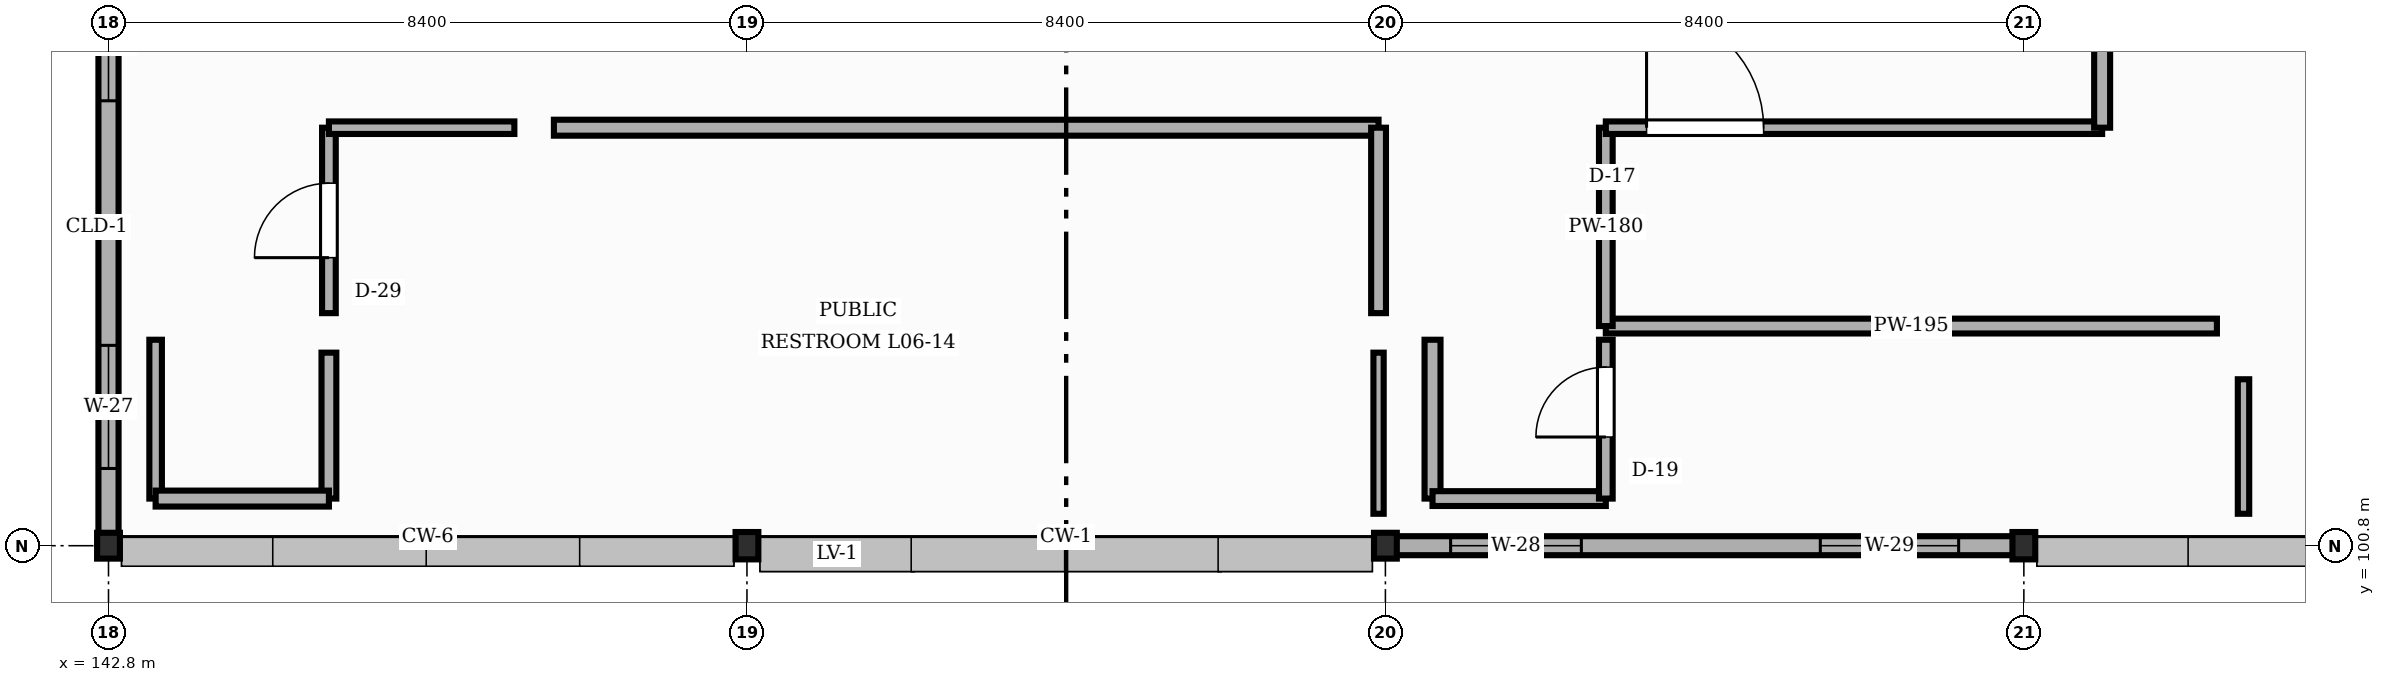
"""IFC4 building model, lengths in metres.
Left out: names, types, materials, properties, quantities, classifications, styles, units other than length and angle.
Written with IfcOpenShell. Run it as: python <this file> out.ifc"""

import sys

from ifc_helpers import new_model, si_unit, direction, frame, frame_2d, origin, origin_2d, place, context, subcontext, project, spatial, rectangle, i_section, extrude, element, fill, save


model = new_model("IFC4")
c1 = context("Model", 3, precision=1e-05, world=origin(), true_north=direction((0.0, 1.0)))
c2 = subcontext(c1, "Body", "Model", "MODEL_VIEW")
j1 = project(units=[si_unit("LENGTHUNIT", "METRE"), si_unit("PLANEANGLEUNIT", "RADIAN")], contexts=[c1])
p1 = place(None, origin())
s1 = spatial("IfcSite", under=j1, at=p1, CompositionType="ELEMENT")
p2 = place(p1, origin())
s2 = spatial("IfcBuilding", under=s1, at=p2, CompositionType="ELEMENT")
p3 = place(p2, frame((0.0, 0.0, 26.1)))
s3 = spatial("IfcBuildingStorey", under=s2, at=p3, CompositionType="ELEMENT", Elevation=26.1)
p4 = place(p3, frame((142.8, 100.8, 0.0), z_axis=(0.0, 0.0, 1.0), x_axis=(1.0, 0.0, 0.0)))
e1 = element("IfcColumn", 1, at=p4, inside=s3, PredefinedType="COLUMN", context=c2, shape_type="SweptSolid", body=[
    extrude(i_section(OverallWidth=0.3, OverallDepth=0.34, WebThickness=0.012, FlangeThickness=0.021, FilletRadius=0.027, at=origin_2d()), origin(), (0.0, 0.0, 1.0), 4.05),
])
p5 = place(p3, frame((151.2, 100.8, 0.0), z_axis=(0.0, 0.0, 1.0), x_axis=(1.0, 0.0, 0.0)))
e2 = element("IfcColumn", 2, at=p5, inside=s3, PredefinedType="COLUMN", context=c2, shape_type="SweptSolid", body=[
    extrude(i_section(OverallWidth=0.3, OverallDepth=0.36, WebThickness=0.012, FlangeThickness=0.022, FilletRadius=0.027, at=origin_2d()), origin(), (0.0, 0.0, 1.0), 4.05),
])
p6 = place(p3, frame((159.6, 100.8, 0.0), z_axis=(0.0, 0.0, 1.0), x_axis=(1.0, 0.0, 0.0)))
e3 = element("IfcColumn", 3, at=p6, inside=s3, PredefinedType="COLUMN", context=c2, shape_type="SweptSolid", body=[
    extrude(i_section(OverallWidth=0.3, OverallDepth=0.34, WebThickness=0.012, FlangeThickness=0.021, FilletRadius=0.027, at=origin_2d()), origin(), (0.0, 0.0, 1.0), 4.05),
])
p7 = place(p3, frame((168.0, 100.8, 0.0), z_axis=(0.0, 0.0, 1.0), x_axis=(1.0, 0.0, 0.0)))
e4 = element("IfcColumn", 4, at=p7, inside=s3, PredefinedType="COLUMN", context=c2, shape_type="SweptSolid", body=[
    extrude(i_section(OverallWidth=0.3, OverallDepth=0.36, WebThickness=0.012, FlangeThickness=0.022, FilletRadius=0.027, at=origin_2d()), origin(), (0.0, 0.0, 1.0), 4.05),
])
p8 = place(p3, frame((142.8, 109.024, 0.0), z_axis=(0.0, 0.0, 1.0), x_axis=(0.0, -1.0, 0.0)))
e5 = element("IfcWall", 5, at=p8, inside=s3, PredefinedType="STANDARD", context=c2, shape_type="SweptSolid", body=[
    extrude(rectangle(XDim=8.058, YDim=0.265, at=frame_2d((4.029, 0.0))), origin(), (0.0, 0.0, 1.0), 3.587),
])
p9 = place(p8, frame((0.85, 0.0, 0.9)))
e6 = element("IfcOpeningElement", 6, at=p9, cuts=e5, PredefinedType="OPENING", context=c2, shape_type="SweptSolid", body=[
    extrude(rectangle(XDim=1.52, YDim=1.45, at=frame_2d((0.76, 0.725))), frame((0.0, 0.142, 0.0), z_axis=(0.0, -1.0, 0.0), x_axis=(1.0, 0.0, 0.0)), (0.0, 0.0, 1.0), 0.285),
])
p10 = place(p8, frame((5.588, 0.0, 0.9)))
e7 = element("IfcOpeningElement", 7, at=p10, cuts=e5, PredefinedType="OPENING", context=c2, shape_type="SweptSolid", body=[
    extrude(rectangle(XDim=1.62, YDim=1.45, at=frame_2d((0.81, 0.725))), frame((0.0, 0.142, 0.0), z_axis=(0.0, -1.0, 0.0), x_axis=(1.0, 0.0, 0.0)), (0.0, 0.0, 1.0), 0.285),
])
p11 = place(p3, frame((159.608, 100.8, 0.0), z_axis=(0.0, 0.0, 1.0), x_axis=(1.0, 0.0, 0.0)))
e8 = element("IfcWall", 8, at=p11, inside=s3, PredefinedType="STANDARD", context=c2, shape_type="SweptSolid", body=[
    extrude(rectangle(XDim=8.384, YDim=0.25, at=frame_2d((4.192, 0.0))), origin(), (0.0, 0.0, 1.0), 3.527),
])
p12 = place(p11, frame((0.85, 0.0, 0.9)))
e9 = element("IfcOpeningElement", 9, at=p12, cuts=e8, PredefinedType="OPENING", context=c2, shape_type="SweptSolid", body=[
    extrude(rectangle(XDim=1.72, YDim=1.45, at=frame_2d((0.86, 0.725))), frame((0.0, 0.135, 0.0), z_axis=(0.0, -1.0, 0.0), x_axis=(1.0, 0.0, 0.0)), (0.0, 0.0, 1.0), 0.27),
])
p13 = place(p11, frame((5.714, 0.0, 0.9)))
e10 = element("IfcOpeningElement", 10, at=p13, cuts=e8, PredefinedType="OPENING", context=c2, shape_type="SweptSolid", body=[
    extrude(rectangle(XDim=1.82, YDim=1.45, at=frame_2d((0.91, 0.725))), frame((0.0, 0.135, 0.0), z_axis=(0.0, -1.0, 0.0), x_axis=(1.0, 0.0, 0.0)), (0.0, 0.0, 1.0), 0.27),
])
p14 = place(p3, frame((170.89, 101.22, -0.004), z_axis=(0.0, 0.0, 1.0), x_axis=(0.0, 1.0, 0.0)))
e11 = element("IfcWall", 11, at=p14, inside=s3, PredefinedType="STANDARD", context=c2, shape_type="SweptSolid", body=[
    extrude(rectangle(XDim=1.77, YDim=0.15, at=frame_2d((0.885, 0.0))), origin(), (0.0, 0.0, 1.0), 3.566),
])
p15 = place(p3, frame((170.54, 103.69, -0.004), z_axis=(0.0, 0.0, 1.0), x_axis=(-1.0, 0.0, 0.0)))
e12 = element("IfcWall", 12, at=p15, inside=s3, PredefinedType="STANDARD", context=c2, shape_type="SweptSolid", body=[
    extrude(rectangle(XDim=8.04, YDim=0.195, at=frame_2d((4.02, 0.0))), origin(), (0.0, 0.0, 1.0), 3.854),
])
p16 = place(p3, frame((162.5, 103.69, -0.004), z_axis=(0.0, 0.0, 1.0), x_axis=(0.0, 1.0, 0.0)))
e13 = element("IfcWall", 13, at=p16, inside=s3, PredefinedType="STANDARD", context=c2, shape_type="SweptSolid", body=[
    extrude(rectangle(XDim=2.61, YDim=0.18, at=frame_2d((1.305, 0.0))), origin(), (0.0, 0.0, 1.0), 3.641),
])
p17 = place(p3, frame((162.5, 106.3, -0.004), z_axis=(0.0, 0.0, 1.0), x_axis=(1.0, 0.0, 0.0)))
e14 = element("IfcWall", 14, at=p17, inside=s3, PredefinedType="STANDARD", context=c2, shape_type="SweptSolid", body=[
    extrude(rectangle(XDim=6.53, YDim=0.165, at=frame_2d((3.265, 0.0))), origin(), (0.0, 0.0, 1.0), 3.854),
])
p18 = place(p17, frame((0.536, 0.0, 0.0)))
e15 = element("IfcOpeningElement", 15, at=p18, cuts=e14, PredefinedType="OPENING", context=c2, shape_type="SweptSolid", body=[
    extrude(rectangle(XDim=1.54, YDim=2.14, at=frame_2d((0.77, 1.07))), frame((0.0, 0.093, 0.0), z_axis=(0.0, -1.0, 0.0), x_axis=(1.0, 0.0, 0.0)), (0.0, 0.0, 1.0), 0.185),
])
p19 = place(p3, frame((169.03, 106.3, -0.004), z_axis=(0.0, 0.0, 1.0), x_axis=(0.0, 1.0, 0.0)))
e16 = element("IfcWall", 16, at=p19, inside=s3, PredefinedType="STANDARD", context=c2, shape_type="SweptSolid", body=[
    extrude(rectangle(XDim=2.28, YDim=0.21, at=frame_2d((1.14, 0.0))), origin(), (0.0, 0.0, 1.0), 3.854),
])
p20 = place(p3, frame((145.7, 101.42, -0.004), z_axis=(0.0, 0.0, 1.0), x_axis=(0.0, 1.0, 0.0)))
e17 = element("IfcWall", 17, at=p20, inside=s3, PredefinedType="STANDARD", context=c2, shape_type="SweptSolid", body=[
    extrude(rectangle(XDim=1.92, YDim=0.195, at=frame_2d((0.96, 0.0))), origin(), (0.0, 0.0, 1.0), 3.591),
])
p21 = place(p3, frame((145.7, 103.86, -0.004), z_axis=(0.0, 0.0, 1.0), x_axis=(0.0, 1.0, 0.0)))
e18 = element("IfcWall", 18, at=p21, inside=s3, PredefinedType="STANDARD", context=c2, shape_type="SweptSolid", body=[
    extrude(rectangle(XDim=2.44, YDim=0.18, at=frame_2d((1.22, 0.0))), origin(), (0.0, 0.0, 1.0), 3.591),
])
p22 = place(p21, frame((0.73, 0.0, 0.0)))
e19 = element("IfcOpeningElement", 19, at=p22, cuts=e18, PredefinedType="OPENING", context=c2, shape_type="SweptSolid", body=[
    extrude(rectangle(XDim=0.98, YDim=2.3, at=frame_2d((0.49, 1.15))), frame((0.0, 0.1, 0.0), z_axis=(0.0, -1.0, 0.0), x_axis=(1.0, 0.0, 0.0)), (0.0, 0.0, 1.0), 0.2),
])
p23 = place(p3, frame((145.7, 106.3, -0.004), z_axis=(0.0, 0.0, 1.0), x_axis=(1.0, 0.0, 0.0)))
e20 = element("IfcWall", 20, at=p23, inside=s3, PredefinedType="STANDARD", context=c2, shape_type="SweptSolid", body=[
    extrude(rectangle(XDim=2.44, YDim=0.165, at=frame_2d((1.22, 0.0))), origin(), (0.0, 0.0, 1.0), 3.854),
])
p24 = place(p3, frame((148.66, 106.3, -0.004), z_axis=(0.0, 0.0, 1.0), x_axis=(1.0, 0.0, 0.0)))
e21 = element("IfcWall", 21, at=p24, inside=s3, PredefinedType="STANDARD", context=c2, shape_type="SweptSolid", body=[
    extrude(rectangle(XDim=10.85, YDim=0.21, at=frame_2d((5.425, 0.0))), origin(), (0.0, 0.0, 1.0), 3.854),
])
p25 = place(p3, frame((159.51, 106.3, -0.004), z_axis=(0.0, 0.0, 1.0), x_axis=(0.0, -1.0, 0.0)))
e22 = element("IfcWall", 22, at=p25, inside=s3, PredefinedType="STANDARD", context=c2, shape_type="SweptSolid", body=[
    extrude(rectangle(XDim=2.44, YDim=0.195, at=frame_2d((1.22, 0.0))), origin(), (0.0, 0.0, 1.0), 3.551),
])
p26 = place(p3, frame((159.51, 103.34, -0.004), z_axis=(0.0, 0.0, 1.0), x_axis=(0.0, -1.0, 0.0)))
e23 = element("IfcWall", 23, at=p26, inside=s3, PredefinedType="STANDARD", context=c2, shape_type="SweptSolid", body=[
    extrude(rectangle(XDim=2.12, YDim=0.135, at=frame_2d((1.06, 0.0))), origin(), (0.0, 0.0, 1.0), 3.551),
])
p27 = place(p3, frame((143.42, 103.51, -0.004), z_axis=(0.0, 0.0, 1.0), x_axis=(0.0, -1.0, 0.0)))
e24 = element("IfcWall", 24, at=p27, inside=s3, PredefinedType="STANDARD", context=c2, shape_type="SweptSolid", body=[
    extrude(rectangle(XDim=2.09, YDim=0.165, at=frame_2d((1.045, 0.0))), origin(), (0.0, 0.0, 1.0), 3.854),
])
p28 = place(p3, frame((143.42, 101.42, -0.004), z_axis=(0.0, 0.0, 1.0), x_axis=(1.0, 0.0, 0.0)))
e25 = element("IfcWall", 25, at=p28, inside=s3, PredefinedType="STANDARD", context=c2, shape_type="SweptSolid", body=[
    extrude(rectangle(XDim=2.28, YDim=0.21, at=frame_2d((1.14, 0.0))), origin(), (0.0, 0.0, 1.0), 3.854),
])
p29 = place(p3, frame((160.22, 103.51, -0.004), z_axis=(0.0, 0.0, 1.0), x_axis=(0.0, -1.0, 0.0)))
e26 = element("IfcWall", 26, at=p29, inside=s3, PredefinedType="STANDARD", context=c2, shape_type="SweptSolid", body=[
    extrude(rectangle(XDim=2.09, YDim=0.21, at=frame_2d((1.045, 0.0))), origin(), (0.0, 0.0, 1.0), 3.854),
])
p30 = place(p3, frame((160.22, 101.42, -0.004), z_axis=(0.0, 0.0, 1.0), x_axis=(1.0, 0.0, 0.0)))
e27 = element("IfcWall", 27, at=p30, inside=s3, PredefinedType="STANDARD", context=c2, shape_type="SweptSolid", body=[
    extrude(rectangle(XDim=2.28, YDim=0.195, at=frame_2d((1.14, 0.0))), origin(), (0.0, 0.0, 1.0), 3.854),
])
p31 = place(p3, frame((162.5, 101.42, -0.004), z_axis=(0.0, 0.0, 1.0), x_axis=(0.0, 1.0, 0.0)))
e28 = element("IfcWall", 28, at=p31, inside=s3, PredefinedType="STANDARD", context=c2, shape_type="SweptSolid", body=[
    extrude(rectangle(XDim=2.09, YDim=0.18, at=frame_2d((1.045, 0.0))), origin(), (0.0, 0.0, 1.0), 3.641),
])
p32 = place(p31, frame((0.81, 0.0, 0.0)))
e29 = element("IfcOpeningElement", 29, at=p32, cuts=e28, PredefinedType="OPENING", context=c2, shape_type="SweptSolid", body=[
    extrude(rectangle(XDim=0.92, YDim=2.22, at=frame_2d((0.46, 1.11))), frame((0.0, 0.1, 0.0), z_axis=(0.0, -1.0, 0.0), x_axis=(1.0, 0.0, 0.0)), (0.0, 0.0, 1.0), 0.2),
])
p33 = place(p9, origin())
e30 = element("IfcWindow", 30, at=p33, inside=s3, PartitioningType="SINGLE_PANEL", PredefinedType="WINDOW", context=c2, shape_type="SweptSolid", body=[
    extrude(rectangle(XDim=1.52, YDim=1.45, at=frame_2d((0.76, 0.725))), frame((0.0, 0.03, 0.0), z_axis=(0.0, -1.0, 0.0), x_axis=(1.0, 0.0, 0.0)), (0.0, 0.0, 1.0), 0.06),
])
fill(e6, e30)
p34 = place(p10, origin())
e31 = element("IfcWindow", 31, at=p34, inside=s3, PartitioningType="SINGLE_PANEL", PredefinedType="WINDOW", context=c2, shape_type="SweptSolid", body=[
    extrude(rectangle(XDim=1.62, YDim=1.45, at=frame_2d((0.81, 0.725))), frame((0.0, 0.03, 0.0), z_axis=(0.0, -1.0, 0.0), x_axis=(1.0, 0.0, 0.0)), (0.0, 0.0, 1.0), 0.06),
])
fill(e7, e31)
p35 = place(p12, origin())
e32 = element("IfcWindow", 32, at=p35, inside=s3, PartitioningType="SINGLE_PANEL", PredefinedType="WINDOW", context=c2, shape_type="SweptSolid", body=[
    extrude(rectangle(XDim=1.72, YDim=1.45, at=frame_2d((0.86, 0.725))), frame((0.0, 0.03, 0.0), z_axis=(0.0, -1.0, 0.0), x_axis=(1.0, 0.0, 0.0)), (0.0, 0.0, 1.0), 0.06),
])
fill(e9, e32)
p36 = place(p13, origin())
e33 = element("IfcWindow", 33, at=p36, inside=s3, PartitioningType="SINGLE_PANEL", PredefinedType="WINDOW", context=c2, shape_type="SweptSolid", body=[
    extrude(rectangle(XDim=1.82, YDim=1.45, at=frame_2d((0.91, 0.725))), frame((0.0, 0.03, 0.0), z_axis=(0.0, -1.0, 0.0), x_axis=(1.0, 0.0, 0.0)), (0.0, 0.0, 1.0), 0.06),
])
fill(e10, e33)
p37 = place(p18, origin())
e34 = element("IfcDoor", 34, at=p37, inside=s3, OperationType="SINGLE_SWING_LEFT", PredefinedType="DOOR", context=c2, shape_type="SweptSolid", body=[
    extrude(rectangle(XDim=1.54, YDim=2.14, at=frame_2d((0.77, 1.07))), frame((0.0, 0.025, 0.0), z_axis=(0.0, -1.0, 0.0), x_axis=(1.0, 0.0, 0.0)), (0.0, 0.0, 1.0), 0.05),
])
fill(e15, e34)
p38 = place(p22, origin())
e35 = element("IfcDoor", 35, at=p38, inside=s3, OperationType="SINGLE_SWING_LEFT", PredefinedType="DOOR", context=c2, shape_type="SweptSolid", body=[
    extrude(rectangle(XDim=0.98, YDim=2.3, at=frame_2d((0.49, 1.15))), frame((0.0, 0.025, 0.0), z_axis=(0.0, -1.0, 0.0), x_axis=(1.0, 0.0, 0.0)), (0.0, 0.0, 1.0), 0.05),
])
fill(e19, e35)
p39 = place(p32, origin())
e36 = element("IfcDoor", 36, at=p39, inside=s3, OperationType="SINGLE_SWING_LEFT", PredefinedType="DOOR", context=c2, shape_type="SweptSolid", body=[
    extrude(rectangle(XDim=0.92, YDim=2.22, at=frame_2d((0.46, 1.11))), frame((0.0, 0.025, 0.0), z_axis=(0.0, -1.0, 0.0), x_axis=(1.0, 0.0, 0.0)), (0.0, 0.0, 1.0), 0.05),
])
fill(e29, e36)
save(model, sys.argv[1])
